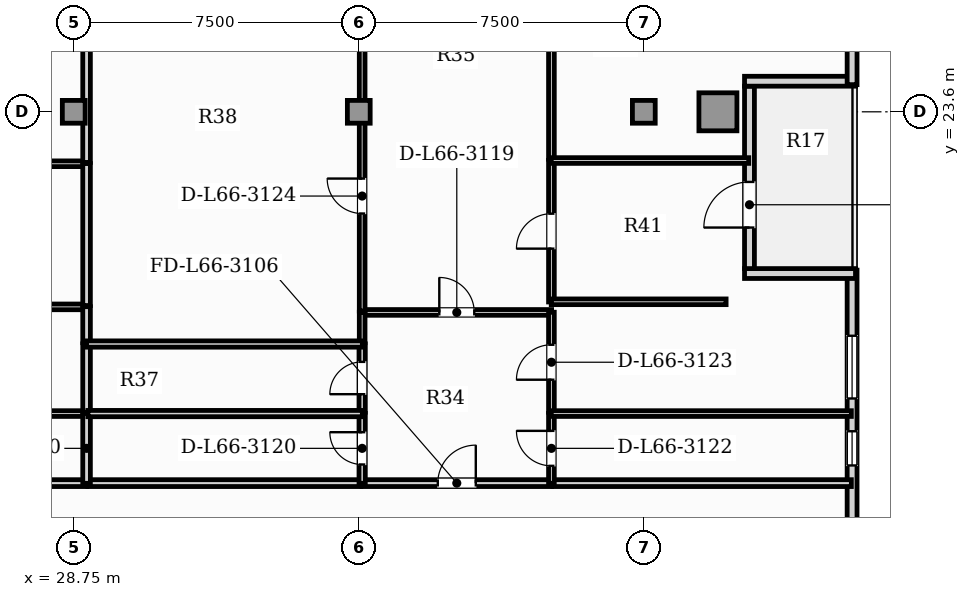
"""IFC4 building model, lengths in metres.
Left out: names, types, materials, properties, quantities, classifications, styles, units other than length and angle.
Written with IfcOpenShell. Run it as: python <this file> out.ifc"""

import sys

from ifc_helpers import new_model, si_unit, direction, frame, frame_2d, origin, origin_2d, place, context, subcontext, project, spatial, rectangle, hollow_rectangle, extrude, element, fill, save


model = new_model("IFC4")
c1 = context("Model", 3, precision=1e-05, world=origin(), true_north=direction((0.0, 1.0)))
c2 = subcontext(c1, "Body", "Model", "MODEL_VIEW")
j1 = project(units=[si_unit("LENGTHUNIT", "METRE"), si_unit("PLANEANGLEUNIT", "RADIAN")], contexts=[c1])
p1 = place(None, origin())
s1 = spatial("IfcSite", under=j1, at=p1, CompositionType="ELEMENT")
p2 = place(p1, origin())
s2 = spatial("IfcBuilding", under=s1, at=p2, CompositionType="ELEMENT")
p3 = place(p2, frame((0.0, 0.0, 268.3)))
s3 = spatial("IfcBuildingStorey", under=s2, at=p3, CompositionType="ELEMENT", Elevation=268.3)
p4 = place(p3, frame((45.7, 23.6, 0.0), z_axis=(0.0, 0.0, 1.0), x_axis=(1.0, 0.0, 0.0)))
e1 = element("IfcColumn", 1, at=p4, inside=s3, PredefinedType="USERDEFINED", context=c2, shape_type="SweptSolid", body=[
    extrude(hollow_rectangle(XDim=1.0, YDim=1.0, WallThickness=0.06, at=origin_2d()), origin(), (0.0, 0.0, 1.0), 3.85),
])
for number, where, z_axis, x_axis in (
    (2, (28.75, 23.6, 0.0), (0.0, 0.0, 1.0), (1.0, 0.0, 0.0)),
    (3, (36.25, 23.6, 0.0), (0.0, 0.0, 1.0), (1.0, 0.0, 0.0)),
    (4, (43.75, 23.6, 0.0), (0.0, 0.0, 1.0), (1.0, 0.0, 0.0)),
):
    element("IfcColumn", number, at=place(p3, frame(where, z_axis=z_axis, x_axis=x_axis)), inside=s3, PredefinedType="COLUMN", context=c2, shape_type="SweptSolid", body=[
        extrude(rectangle(XDim=0.6, YDim=0.6, at=origin_2d()), origin(), (0.0, 0.0, 1.0), 3.85),
    ])
p5 = place(p3, frame((49.23, 3.24, 0.0), z_axis=(0.0, 0.0, 1.0), x_axis=(0.0, 1.0, 0.0)))
e5 = element("IfcWall", 5, at=p5, inside=s3, PredefinedType="SOLIDWALL", context=c2, shape_type="SweptSolid", body=[
    extrude(rectangle(XDim=16.195, YDim=0.26, at=frame_2d((8.097, 0.0))), origin(), (0.0, 0.0, 1.0), 3.65),
])
p6 = place(p5, frame((11.055, 0.0, 0.95)))
e6 = element("IfcOpeningElement", 6, at=p6, cuts=e5, PredefinedType="OPENING", context=c2, shape_type="SweptSolid", body=[
    extrude(rectangle(XDim=0.9, YDim=1.5, at=frame_2d((0.45, 0.75))), frame((0.0, 0.14, 0.0), z_axis=(0.0, -1.0, 0.0), x_axis=(1.0, 0.0, 0.0)), (0.0, 0.0, 1.0), 0.28),
])
p7 = place(p5, frame((12.817, 0.0, 0.88)))
e7 = element("IfcOpeningElement", 7, at=p7, cuts=e5, PredefinedType="OPENING", context=c2, shape_type="SweptSolid", body=[
    extrude(rectangle(XDim=1.65, YDim=2.0, at=frame_2d((0.825, 1.0))), frame((0.0, 0.14, 0.0), z_axis=(0.0, -1.0, 0.0), x_axis=(1.0, 0.0, 0.0)), (0.0, 0.0, 1.0), 0.28),
])
p8 = place(p3, frame((49.32, 19.345, 0.0), z_axis=(0.0, 0.0, 1.0), x_axis=(-1.0, 0.0, 0.0)))
e8 = element("IfcWall", 8, at=p8, inside=s3, PredefinedType="SOLIDWALL", context=c2, shape_type="SweptSolid", body=[
    extrude(rectangle(XDim=2.92, YDim=0.26, at=frame_2d((1.46, 0.0))), origin(), (0.0, 0.0, 1.0), 3.65),
])
p9 = place(p3, frame((46.53, 19.475, 0.0), z_axis=(0.0, 0.0, 1.0), x_axis=(0.0, 1.0, 0.0)))
e9 = element("IfcWall", 9, at=p9, inside=s3, PredefinedType="SOLIDWALL", context=c2, shape_type="SweptSolid", body=[
    extrude(rectangle(XDim=4.8, YDim=0.26, at=frame_2d((2.4, 0.0))), origin(), (0.0, 0.0, 1.0), 3.19),
])
p10 = place(p9, frame((1.08, 0.0, 0.0)))
e10 = element("IfcOpeningElement", 10, at=p10, cuts=e9, PredefinedType="OPENING", context=c2, shape_type="SweptSolid", body=[
    extrude(rectangle(XDim=1.2, YDim=2.2, at=frame_2d((0.6, 1.1))), frame((0.0, 0.14, 0.0), z_axis=(0.0, -1.0, 0.0), x_axis=(1.0, 0.0, 0.0)), (0.0, 0.0, 1.0), 0.28),
])
p11 = place(p3, frame((46.4, 24.405, 0.0), z_axis=(0.0, 0.0, 1.0), x_axis=(1.0, 0.0, 0.0)))
e11 = element("IfcWall", 11, at=p11, inside=s3, PredefinedType="SOLIDWALL", context=c2, shape_type="SweptSolid", body=[
    extrude(rectangle(XDim=2.92, YDim=0.26, at=frame_2d((1.46, 0.0))), origin(), (0.0, 0.0, 1.0), 3.65),
])
p12 = place(p3, frame((49.23, 24.315, 0.0), z_axis=(0.0, 0.0, 1.0), x_axis=(0.0, 1.0, 0.0)))
e12 = element("IfcWall", 12, at=p12, inside=s3, PredefinedType="SOLIDWALL", context=c2, shape_type="SweptSolid", body=[
    extrude(rectangle(XDim=7.795, YDim=0.26, at=frame_2d((3.897, 0.0))), origin(), (0.0, 0.0, 1.0), 3.65),
])
p13 = place(p12, frame((2.985, 0.0, 0.95)))
e13 = element("IfcOpeningElement", 13, at=p13, cuts=e12, PredefinedType="OPENING", context=c2, shape_type="SweptSolid", body=[
    extrude(rectangle(XDim=0.9, YDim=1.5, at=frame_2d((0.45, 0.75))), frame((0.0, 0.14, 0.0), z_axis=(0.0, -1.0, 0.0), x_axis=(1.0, 0.0, 0.0)), (0.0, 0.0, 1.0), 0.28),
])
p14 = place(p12, frame((4.5, 0.0, 0.88)))
e14 = element("IfcOpeningElement", 14, at=p14, cuts=e12, PredefinedType="OPENING", context=c2, shape_type="SweptSolid", body=[
    extrude(rectangle(XDim=1.65, YDim=2.0, at=frame_2d((0.825, 1.0))), frame((0.0, 0.14, 0.0), z_axis=(0.0, -1.0, 0.0), x_axis=(1.0, 0.0, 0.0)), (0.0, 0.0, 1.0), 0.28),
])
p15 = place(p3, frame((21.617, 13.83, 0.0), z_axis=(0.0, 0.0, 1.0), x_axis=(1.0, 0.0, 0.0)))
e15 = element("IfcWall", 15, at=p15, inside=s3, PredefinedType="PARTITIONING", context=c2, shape_type="SweptSolid", body=[
    extrude(rectangle(XDim=7.476, YDim=0.18, at=frame_2d((3.738, 0.0))), origin(), (0.0, 0.0, 1.0), 3.65),
])
p16 = place(p3, frame((36.334, 13.83, 0.0), z_axis=(0.0, 0.0, 1.0), x_axis=(1.0, 0.0, 0.0)))
e16 = element("IfcWall", 16, at=p16, inside=s3, PredefinedType="PARTITIONING", context=c2, shape_type="SweptSolid", body=[
    extrude(rectangle(XDim=4.99, YDim=0.18, at=frame_2d((2.495, 0.0))), origin(), (0.0, 0.0, 1.0), 3.65),
])
p17 = place(p16, frame((1.995, 0.0, 0.0)))
e17 = element("IfcOpeningElement", 17, at=p17, cuts=e16, PredefinedType="OPENING", context=c2, shape_type="SweptSolid", body=[
    extrude(rectangle(XDim=1.0, YDim=2.15, at=frame_2d((0.5, 1.075))), frame((0.0, 0.1, 0.0), z_axis=(0.0, -1.0, 0.0), x_axis=(1.0, 0.0, 0.0)), (0.0, 0.0, 1.0), 0.2),
])
p18 = place(p3, frame((29.123, 13.83, 0.0), z_axis=(0.0, 0.0, 1.0), x_axis=(1.0, 0.0, 0.0)))
e18 = element("IfcWall", 18, at=p18, inside=s3, PredefinedType="PARTITIONING", context=c2, shape_type="SweptSolid", body=[
    extrude(rectangle(XDim=7.181, YDim=0.18, at=frame_2d((3.591, 0.0))), origin(), (0.0, 0.0, 1.0), 3.65),
])
p19 = place(p3, frame((41.354, 13.83, 0.0), z_axis=(0.0, 0.0, 1.0), x_axis=(1.0, 0.0, 0.0)))
e19 = element("IfcWall", 19, at=p19, inside=s3, PredefinedType="PARTITIONING", context=c2, shape_type="SweptSolid", body=[
    extrude(rectangle(XDim=7.857, YDim=0.18, at=frame_2d((3.928, 0.0))), origin(), (0.0, 0.0, 1.0), 3.65),
])
p20 = place(p3, frame((21.577, 15.66, 0.0), z_axis=(0.0, 0.0, 1.0), x_axis=(1.0, 0.0, 0.0)))
e20 = element("IfcWall", 20, at=p20, inside=s3, PredefinedType="PARTITIONING", context=c2, shape_type="SweptSolid", body=[
    extrude(rectangle(XDim=7.516, YDim=0.15, at=frame_2d((3.758, 0.0))), origin(), (0.0, 0.0, 1.0), 3.65),
])
p21 = place(p3, frame((29.088, 13.825, 0.0), z_axis=(0.0, 0.0, 1.0), x_axis=(0.0, 1.0, 0.0)))
e21 = element("IfcWall", 21, at=p21, inside=s3, PredefinedType="PARTITIONING", context=c2, shape_type="SweptSolid", body=[
    extrude(rectangle(XDim=1.84, YDim=0.2, at=frame_2d((0.92, 0.0))), origin(), (0.0, 0.0, 1.0), 3.65),
])
p22 = place(p3, frame((21.577, 18.468, 0.0), z_axis=(0.0, 0.0, 1.0), x_axis=(1.0, 0.0, 0.0)))
e22 = element("IfcWall", 22, at=p22, inside=s3, PredefinedType="PARTITIONING", context=c2, shape_type="SweptSolid", body=[
    extrude(rectangle(XDim=7.516, YDim=0.15, at=frame_2d((3.758, 0.0))), origin(), (0.0, 0.0, 1.0), 3.65),
])
p23 = place(p3, frame((29.088, 15.695, 0.0), z_axis=(0.0, 0.0, 1.0), x_axis=(0.0, 1.0, 0.0)))
e23 = element("IfcWall", 23, at=p23, inside=s3, PredefinedType="PARTITIONING", context=c2, shape_type="SweptSolid", body=[
    extrude(rectangle(XDim=1.8, YDim=0.2, at=frame_2d((0.9, 0.0))), origin(), (0.0, 0.0, 1.0), 3.65),
])
p24 = place(p3, frame((29.088, 17.525, 0.0), z_axis=(0.0, 0.0, 1.0), x_axis=(0.0, 1.0, 0.0)))
e24 = element("IfcWall", 24, at=p24, inside=s3, PredefinedType="PARTITIONING", context=c2, shape_type="SweptSolid", body=[
    extrude(rectangle(XDim=0.948, YDim=0.2, at=frame_2d((0.474, 0.0))), origin(), (0.0, 0.0, 1.0), 3.65),
])
p25 = place(p3, frame((21.577, 22.233, 0.0), z_axis=(0.0, 0.0, 1.0), x_axis=(1.0, 0.0, 0.0)))
e25 = element("IfcWall", 25, at=p25, inside=s3, PredefinedType="PARTITIONING", context=c2, shape_type="SweptSolid", body=[
    extrude(rectangle(XDim=7.516, YDim=0.15, at=frame_2d((3.758, 0.0))), origin(), (0.0, 0.0, 1.0), 3.65),
])
p26 = place(p3, frame((29.088, 18.502, 0.0), z_axis=(0.0, 0.0, 1.0), x_axis=(0.0, 1.0, 0.0)))
e26 = element("IfcWall", 26, at=p26, inside=s3, PredefinedType="PARTITIONING", context=c2, shape_type="SweptSolid", body=[
    extrude(rectangle(XDim=3.736, YDim=0.2, at=frame_2d((1.868, 0.0))), origin(), (0.0, 0.0, 1.0), 3.65),
])
p27 = place(p3, frame((29.088, 22.268, 0.0), z_axis=(0.0, 0.0, 1.0), x_axis=(0.0, 1.0, 0.0)))
e27 = element("IfcWall", 27, at=p27, inside=s3, PredefinedType="PARTITIONING", context=c2, shape_type="SweptSolid", body=[
    extrude(rectangle(XDim=4.697, YDim=0.2, at=frame_2d((2.349, 0.0))), origin(), (0.0, 0.0, 1.0), 3.65),
])
p28 = place(p3, frame((36.334, 18.322, 0.0), z_axis=(0.0, 0.0, 1.0), x_axis=(1.0, 0.0, 0.0)))
e28 = element("IfcWall", 28, at=p28, inside=s3, PredefinedType="PARTITIONING", context=c2, shape_type="SweptSolid", body=[
    extrude(rectangle(XDim=4.99, YDim=0.15, at=frame_2d((2.495, 0.0))), origin(), (0.0, 0.0, 1.0), 3.65),
])
p29 = place(p28, frame((2.035, 0.0, 0.0)))
e29 = element("IfcOpeningElement", 29, at=p29, cuts=e28, PredefinedType="OPENING", context=c2, shape_type="SweptSolid", body=[
    extrude(rectangle(XDim=0.92, YDim=2.1, at=frame_2d((0.46, 1.05))), frame((0.0, 0.085, 0.0), z_axis=(0.0, -1.0, 0.0), x_axis=(1.0, 0.0, 0.0)), (0.0, 0.0, 1.0), 0.17),
])
p30 = place(p3, frame((36.339, 13.825, 0.0), z_axis=(0.0, 0.0, 1.0), x_axis=(0.0, 1.0, 0.0)))
e30 = element("IfcWall", 30, at=p30, inside=s3, PredefinedType="PLUMBINGWALL", context=c2, shape_type="SweptSolid", body=[
    extrude(rectangle(XDim=1.84, YDim=0.165, at=frame_2d((0.92, 0.0))), origin(), (0.0, 0.0, 1.0), 3.295),
])
p31 = place(p30, frame((0.495, 0.0, 0.0)))
e31 = element("IfcOpeningElement", 31, at=p31, cuts=e30, PredefinedType="OPENING", context=c2, shape_type="SweptSolid", body=[
    extrude(rectangle(XDim=0.85, YDim=2.1, at=frame_2d((0.425, 1.05))), frame((0.0, 0.093, 0.0), z_axis=(0.0, -1.0, 0.0), x_axis=(1.0, 0.0, 0.0)), (0.0, 0.0, 1.0), 0.185),
])
p32 = place(p3, frame((36.339, 15.695, 0.0), z_axis=(0.0, 0.0, 1.0), x_axis=(0.0, 1.0, 0.0)))
e32 = element("IfcWall", 32, at=p32, inside=s3, PredefinedType="PLUMBINGWALL", context=c2, shape_type="SweptSolid", body=[
    extrude(rectangle(XDim=1.8, YDim=0.165, at=frame_2d((0.9, 0.0))), origin(), (0.0, 0.0, 1.0), 3.295),
])
p33 = place(p32, frame((0.475, 0.0, 0.0)))
e33 = element("IfcOpeningElement", 33, at=p33, cuts=e32, PredefinedType="OPENING", context=c2, shape_type="SweptSolid", body=[
    extrude(rectangle(XDim=0.85, YDim=2.1, at=frame_2d((0.425, 1.05))), frame((0.0, 0.093, 0.0), z_axis=(0.0, -1.0, 0.0), x_axis=(1.0, 0.0, 0.0)), (0.0, 0.0, 1.0), 0.185),
])
p34 = place(p3, frame((36.339, 17.525, 0.0), z_axis=(0.0, 0.0, 1.0), x_axis=(0.0, 1.0, 0.0)))
e34 = element("IfcWall", 34, at=p34, inside=s3, PredefinedType="PARTITIONING", context=c2, shape_type="SweptSolid", body=[
    extrude(rectangle(XDim=0.802, YDim=0.15, at=frame_2d((0.401, 0.0))), origin(), (0.0, 0.0, 1.0), 3.295),
])
p35 = place(p3, frame((41.319, 13.825, 0.0), z_axis=(0.0, 0.0, 1.0), x_axis=(0.0, 1.0, 0.0)))
e35 = element("IfcWall", 35, at=p35, inside=s3, PredefinedType="PARTITIONING", context=c2, shape_type="SweptSolid", body=[
    extrude(rectangle(XDim=1.84, YDim=0.15, at=frame_2d((0.92, 0.0))), origin(), (0.0, 0.0, 1.0), 3.65),
])
p36 = place(p35, frame((0.46, 0.0, 0.0)))
e36 = element("IfcOpeningElement", 36, at=p36, cuts=e35, PredefinedType="OPENING", context=c2, shape_type="SweptSolid", body=[
    extrude(rectangle(XDim=0.92, YDim=2.1, at=frame_2d((0.46, 1.05))), frame((0.0, 0.085, 0.0), z_axis=(0.0, -1.0, 0.0), x_axis=(1.0, 0.0, 0.0)), (0.0, 0.0, 1.0), 0.17),
])
p37 = place(p3, frame((41.319, 15.695, 0.0), z_axis=(0.0, 0.0, 1.0), x_axis=(0.0, 1.0, 0.0)))
e37 = element("IfcWall", 37, at=p37, inside=s3, PredefinedType="PARTITIONING", context=c2, shape_type="SweptSolid", body=[
    extrude(rectangle(XDim=2.631, YDim=0.15, at=frame_2d((1.316, 0.0))), origin(), (0.0, 0.0, 1.0), 3.65),
])
p38 = place(p37, frame((0.856, 0.0, 0.0)))
e38 = element("IfcOpeningElement", 38, at=p38, cuts=e37, PredefinedType="OPENING", context=c2, shape_type="SweptSolid", body=[
    extrude(rectangle(XDim=0.92, YDim=2.1, at=frame_2d((0.46, 1.05))), frame((0.0, 0.085, 0.0), z_axis=(0.0, -1.0, 0.0), x_axis=(1.0, 0.0, 0.0)), (0.0, 0.0, 1.0), 0.17),
])
p39 = place(p3, frame((36.339, 18.356, 0.0), z_axis=(0.0, 0.0, 1.0), x_axis=(0.0, 1.0, 0.0)))
e39 = element("IfcWall", 39, at=p39, inside=s3, PredefinedType="PARTITIONING", context=c2, shape_type="SweptSolid", body=[
    extrude(rectangle(XDim=8.648, YDim=0.15, at=frame_2d((4.324, 0.0))), origin(), (0.0, 0.0, 1.0), 3.295),
])
p40 = place(p39, frame((2.567, 0.0, 0.0)))
e40 = element("IfcOpeningElement", 40, at=p40, cuts=e39, PredefinedType="OPENING", context=c2, shape_type="SweptSolid", body=[
    extrude(rectangle(XDim=0.92, YDim=2.1, at=frame_2d((0.46, 1.05))), frame((0.0, 0.085, 0.0), z_axis=(0.0, -1.0, 0.0), x_axis=(1.0, 0.0, 0.0)), (0.0, 0.0, 1.0), 0.17),
])
p41 = place(p3, frame((41.319, 18.596, 0.0), z_axis=(0.0, 0.0, 1.0), x_axis=(0.0, 1.0, 0.0)))
e41 = element("IfcWall", 41, at=p41, inside=s3, PredefinedType="PARTITIONING", context=c2, shape_type="SweptSolid", body=[
    extrude(rectangle(XDim=3.727, YDim=0.15, at=frame_2d((1.863, 0.0))), origin(), (0.0, 0.0, 1.0), 3.65),
])
p42 = place(p41, frame((1.403, 0.0, 0.0)))
e42 = element("IfcOpeningElement", 42, at=p42, cuts=e41, PredefinedType="OPENING", context=c2, shape_type="SweptSolid", body=[
    extrude(rectangle(XDim=0.92, YDim=2.1, at=frame_2d((0.46, 1.05))), frame((0.0, 0.085, 0.0), z_axis=(0.0, -1.0, 0.0), x_axis=(1.0, 0.0, 0.0)), (0.0, 0.0, 1.0), 0.17),
])
p43 = place(p3, frame((41.319, 22.353, 0.0), z_axis=(0.0, 0.0, 1.0), x_axis=(0.0, 1.0, 0.0)))
e43 = element("IfcWall", 43, at=p43, inside=s3, PredefinedType="PARTITIONING", context=c2, shape_type="SweptSolid", body=[
    extrude(rectangle(XDim=4.652, YDim=0.15, at=frame_2d((2.326, 0.0))), origin(), (0.0, 0.0, 1.0), 3.65),
])
p44 = place(p3, frame((29.123, 15.66, 0.0), z_axis=(0.0, 0.0, 1.0), x_axis=(1.0, 0.0, 0.0)))
e44 = element("IfcWall", 44, at=p44, inside=s3, PredefinedType="PLUMBINGWALL", context=c2, shape_type="SweptSolid", body=[
    extrude(rectangle(XDim=7.221, YDim=0.165, at=frame_2d((3.611, 0.0))), origin(), (0.0, 0.0, 1.0), 3.65),
])
p45 = place(p3, frame((29.083, 17.49, 0.0), z_axis=(0.0, 0.0, 1.0), x_axis=(1.0, 0.0, 0.0)))
e45 = element("IfcWall", 45, at=p45, inside=s3, PredefinedType="PLUMBINGWALL", context=c2, shape_type="SweptSolid", body=[
    extrude(rectangle(XDim=7.261, YDim=0.165, at=frame_2d((3.631, 0.0))), origin(), (0.0, 0.0, 1.0), 3.65),
])
p46 = place(p3, frame((41.314, 15.66, 0.0), z_axis=(0.0, 0.0, 1.0), x_axis=(1.0, 0.0, 0.0)))
e46 = element("IfcWall", 46, at=p46, inside=s3, PredefinedType="PARTITIONING", context=c2, shape_type="SweptSolid", body=[
    extrude(rectangle(XDim=7.897, YDim=0.15, at=frame_2d((3.948, 0.0))), origin(), (0.0, 0.0, 1.0), 3.65),
])
p47 = place(p3, frame((41.314, 18.601, 0.0), z_axis=(0.0, 0.0, 1.0), x_axis=(1.0, 0.0, 0.0)))
e47 = element("IfcWall", 47, at=p47, inside=s3, PredefinedType="PARTITIONING", context=c2, shape_type="SweptSolid", body=[
    extrude(rectangle(XDim=4.601, YDim=0.15, at=frame_2d((2.301, 0.0))), origin(), (0.0, 0.0, 1.0), 3.65),
])
p48 = place(p3, frame((41.314, 22.318, 0.0), z_axis=(0.0, 0.0, 1.0), x_axis=(1.0, 0.0, 0.0)))
e48 = element("IfcWall", 48, at=p48, inside=s3, PredefinedType="PARTITIONING", context=c2, shape_type="SweptSolid", body=[
    extrude(rectangle(XDim=5.197, YDim=0.15, at=frame_2d((2.598, 0.0))), origin(), (0.0, 0.0, 1.0), 3.65),
])
p49 = place(p10, frame((1.2, 0.0, 0.0), z_axis=(0.0, 0.0, 1.0), x_axis=(-1.0, 0.0, 0.0)))
e49 = element("IfcDoor", 49, at=p49, inside=s3, OperationType="SINGLE_SWING_RIGHT", PredefinedType="DOOR", context=c2, shape_type="SweptSolid", body=[
    extrude(rectangle(XDim=1.2, YDim=2.2, at=frame_2d((0.6, 1.1))), frame((0.0, 0.025, 0.0), z_axis=(0.0, -1.0, 0.0), x_axis=(1.0, 0.0, 0.0)), (0.0, 0.0, 1.0), 0.05),
])
fill(e10, e49)
p50 = place(p6, origin())
e50 = element("IfcWindow", 50, at=p50, inside=s3, PartitioningType="SINGLE_PANEL", PredefinedType="WINDOW", context=c2, shape_type="SweptSolid", body=[
    extrude(rectangle(XDim=0.9, YDim=1.5, at=frame_2d((0.45, 0.75))), frame((0.0, 0.03, 0.0), z_axis=(0.0, -1.0, 0.0), x_axis=(1.0, 0.0, 0.0)), (0.0, 0.0, 1.0), 0.06),
])
fill(e6, e50)
p51 = place(p7, origin())
e51 = element("IfcWindow", 51, at=p51, inside=s3, PartitioningType="SINGLE_PANEL", PredefinedType="WINDOW", context=c2, shape_type="SweptSolid", body=[
    extrude(rectangle(XDim=1.65, YDim=2.0, at=frame_2d((0.825, 1.0))), frame((0.0, 0.03, 0.0), z_axis=(0.0, -1.0, 0.0), x_axis=(1.0, 0.0, 0.0)), (0.0, 0.0, 1.0), 0.06),
])
fill(e7, e51)
p52 = place(p17, origin())
e52 = element("IfcDoor", 52, at=p52, inside=s3, OperationType="SINGLE_SWING_RIGHT", PredefinedType="DOOR", context=c2, shape_type="SweptSolid", body=[
    extrude(rectangle(XDim=1.0, YDim=2.15, at=frame_2d((0.5, 1.075))), frame((0.0, 0.025, 0.0), z_axis=(0.0, -1.0, 0.0), x_axis=(1.0, 0.0, 0.0)), (0.0, 0.0, 1.0), 0.05),
])
fill(e17, e52)
p53 = place(p29, origin())
e53 = element("IfcDoor", 53, at=p53, inside=s3, OperationType="SINGLE_SWING_LEFT", PredefinedType="DOOR", context=c2, shape_type="SweptSolid", body=[
    extrude(rectangle(XDim=0.92, YDim=2.1, at=frame_2d((0.46, 1.05))), frame((0.0, 0.025, 0.0), z_axis=(0.0, -1.0, 0.0), x_axis=(1.0, 0.0, 0.0)), (0.0, 0.0, 1.0), 0.05),
])
fill(e29, e53)
p54 = place(p31, origin())
e54 = element("IfcDoor", 54, at=p54, inside=s3, OperationType="SINGLE_SWING_RIGHT", PredefinedType="DOOR", context=c2, shape_type="SweptSolid", body=[
    extrude(rectangle(XDim=0.85, YDim=2.1, at=frame_2d((0.425, 1.05))), frame((0.0, 0.025, 0.0), z_axis=(0.0, -1.0, 0.0), x_axis=(1.0, 0.0, 0.0)), (0.0, 0.0, 1.0), 0.05),
])
fill(e31, e54)
p55 = place(p33, origin())
e55 = element("IfcDoor", 55, at=p55, inside=s3, OperationType="SINGLE_SWING_LEFT", PredefinedType="DOOR", context=c2, shape_type="SweptSolid", body=[
    extrude(rectangle(XDim=0.85, YDim=2.1, at=frame_2d((0.425, 1.05))), frame((0.0, 0.025, 0.0), z_axis=(0.0, -1.0, 0.0), x_axis=(1.0, 0.0, 0.0)), (0.0, 0.0, 1.0), 0.05),
])
fill(e33, e55)
p56 = place(p36, origin())
e56 = element("IfcDoor", 56, at=p56, inside=s3, OperationType="SINGLE_SWING_RIGHT", PredefinedType="DOOR", context=c2, shape_type="SweptSolid", body=[
    extrude(rectangle(XDim=0.92, YDim=2.1, at=frame_2d((0.46, 1.05))), frame((0.0, 0.025, 0.0), z_axis=(0.0, -1.0, 0.0), x_axis=(1.0, 0.0, 0.0)), (0.0, 0.0, 1.0), 0.05),
])
fill(e36, e56)
p57 = place(p38, origin())
e57 = element("IfcDoor", 57, at=p57, inside=s3, OperationType="SINGLE_SWING_LEFT", PredefinedType="DOOR", context=c2, shape_type="SweptSolid", body=[
    extrude(rectangle(XDim=0.92, YDim=2.1, at=frame_2d((0.46, 1.05))), frame((0.0, 0.025, 0.0), z_axis=(0.0, -1.0, 0.0), x_axis=(1.0, 0.0, 0.0)), (0.0, 0.0, 1.0), 0.05),
])
fill(e38, e57)
p58 = place(p40, origin())
e58 = element("IfcDoor", 58, at=p58, inside=s3, OperationType="SINGLE_SWING_RIGHT", PredefinedType="DOOR", context=c2, shape_type="SweptSolid", body=[
    extrude(rectangle(XDim=0.92, YDim=2.1, at=frame_2d((0.46, 1.05))), frame((0.0, 0.025, 0.0), z_axis=(0.0, -1.0, 0.0), x_axis=(1.0, 0.0, 0.0)), (0.0, 0.0, 1.0), 0.05),
])
fill(e40, e58)
p59 = place(p42, origin())
e59 = element("IfcDoor", 59, at=p59, inside=s3, OperationType="SINGLE_SWING_LEFT", PredefinedType="DOOR", context=c2, shape_type="SweptSolid", body=[
    extrude(rectangle(XDim=0.92, YDim=2.1, at=frame_2d((0.46, 1.05))), frame((0.0, 0.025, 0.0), z_axis=(0.0, -1.0, 0.0), x_axis=(1.0, 0.0, 0.0)), (0.0, 0.0, 1.0), 0.05),
])
fill(e42, e59)
save(model, sys.argv[1])
